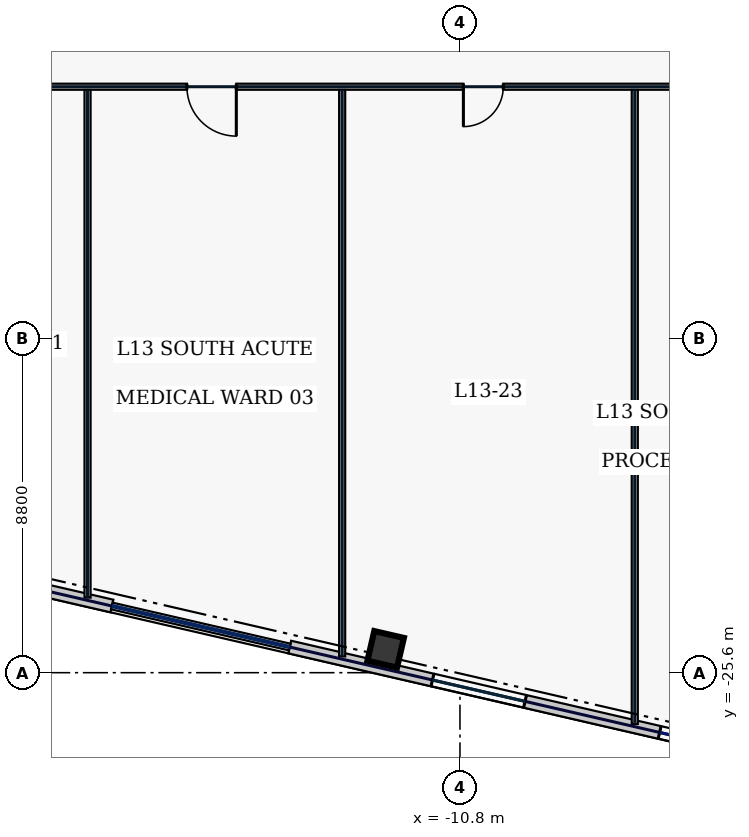
"""IFC4 building model, lengths in metres.
Left out: names, types, materials, properties, quantities, classifications, styles, units other than length and angle.
Written with IfcOpenShell. Run it as: python <this file> out.ifc"""

import sys

from ifc_helpers import new_model, si_unit, direction, frame, frame_2d, origin, origin_2d, place, context, subcontext, project, spatial, rectangle, hollow_rectangle, extrude, element, fill, save


model = new_model("IFC4")
c1 = context("Model", 3, precision=1e-05, world=origin(), true_north=direction((0.0, 1.0)))
c2 = subcontext(c1, "Body", "Model", "MODEL_VIEW")
j1 = project(units=[si_unit("LENGTHUNIT", "METRE"), si_unit("PLANEANGLEUNIT", "RADIAN")], contexts=[c1])
p1 = place(None, origin())
s1 = spatial("IfcSite", under=j1, at=p1, CompositionType="ELEMENT")
p2 = place(p1, origin())
s2 = spatial("IfcBuilding", under=s1, at=p2, CompositionType="ELEMENT")
p3 = place(p2, frame((0.0, 0.0, 63.4)))
s3 = spatial("IfcBuildingStorey", under=s2, at=p3, CompositionType="ELEMENT", Elevation=63.4)
p4 = place(p3, frame((-12.755, -24.985, 0.0), z_axis=(0.0, 0.0, 1.0), x_axis=(0.974370064785, -0.224951054344, 0.0)))
e1 = element("IfcColumn", 1, at=p4, inside=s3, PredefinedType="COLUMN", context=c2, shape_type="SweptSolid", body=[
    extrude(hollow_rectangle(XDim=0.8, YDim=0.8, WallThickness=0.036, at=origin_2d()), origin(), (0.0, 0.0, 1.0), 3.74),
])
p5 = place(p3, frame((-42.029, -18.75, 0.0), z_axis=(0.0, 0.0, 1.0), x_axis=(0.97436993772, -0.224951604723, 0.0)))
e2 = element("IfcWall", 2, at=p5, inside=s3, PredefinedType="STANDARD", context=c2, shape_type="SweptSolid", body=[
    extrude(rectangle(XDim=22.651, YDim=0.34, at=frame_2d((11.326, 0.0))), origin(), (0.0, 0.0, 1.0), 3.74),
])
p6 = place(p5, frame((2.062, 0.0, 0.72)))
e3 = element("IfcOpeningElement", 3, at=p6, cuts=e2, PredefinedType="OPENING", context=c2, shape_type="SweptSolid", body=[
    extrude(rectangle(XDim=2.5, YDim=2.15, at=frame_2d((1.25, 1.075))), frame((0.0, 0.18, 0.0), z_axis=(0.0, -1.0, 0.0), x_axis=(1.0, 0.0, 0.0)), (0.0, 0.0, 1.0), 0.36),
])
p7 = place(p5, frame((6.546, 0.0, 0.72)))
e4 = element("IfcOpeningElement", 4, at=p7, cuts=e2, PredefinedType="OPENING", context=c2, shape_type="SweptSolid", body=[
    extrude(rectangle(XDim=2.5, YDim=2.15, at=frame_2d((1.25, 1.075))), frame((0.0, 0.18, 0.0), z_axis=(0.0, -1.0, 0.0), x_axis=(1.0, 0.0, 0.0)), (0.0, 0.0, 1.0), 0.36),
])
p8 = place(p5, frame((13.461, 0.0, 0.72)))
e5 = element("IfcOpeningElement", 5, at=p8, cuts=e2, PredefinedType="OPENING", context=c2, shape_type="SweptSolid", body=[
    extrude(rectangle(XDim=0.85, YDim=1.85, at=frame_2d((0.425, 0.925))), frame((0.0, 0.18, 0.0), z_axis=(0.0, -1.0, 0.0), x_axis=(1.0, 0.0, 0.0)), (0.0, 0.0, 1.0), 0.36),
])
p9 = place(p3, frame((-15.281, -24.925, 0.0), z_axis=(0.0, 0.0, 1.0), x_axis=(0.974370193991, -0.22495049469, 0.0)))
e6 = element("IfcWall", 6, at=p9, inside=s3, PredefinedType="STANDARD", context=c2, shape_type="SweptSolid", body=[
    extrude(rectangle(XDim=14.697, YDim=0.34, at=frame_2d((7.349, 0.0))), origin(), (0.0, 0.0, 1.0), 3.74),
])
p10 = place(p9, frame((3.856, 0.0, 0.72)))
e7 = element("IfcOpeningElement", 7, at=p10, cuts=e6, PredefinedType="OPENING", context=c2, shape_type="SweptSolid", body=[
    extrude(rectangle(XDim=2.5, YDim=2.15, at=frame_2d((1.25, 1.075))), frame((0.0, 0.18, 0.0), z_axis=(0.0, -1.0, 0.0), x_axis=(1.0, 0.0, 0.0)), (0.0, 0.0, 1.0), 0.36),
])
p11 = place(p9, frame((9.991, 0.0, 0.72)))
e8 = element("IfcOpeningElement", 8, at=p11, cuts=e6, PredefinedType="OPENING", context=c2, shape_type="SweptSolid", body=[
    extrude(rectangle(XDim=0.85, YDim=1.85, at=frame_2d((0.425, 0.925))), frame((0.0, 0.18, 0.0), z_axis=(0.0, -1.0, 0.0), x_axis=(1.0, 0.0, 0.0)), (0.0, 0.0, 1.0), 0.36),
])
p12 = place(p3, frame((29.415, -10.18, 0.0), z_axis=(0.0, 0.0, 1.0), x_axis=(-1.0, 0.0, 0.0)))
e9 = element("IfcWall", 9, at=p12, inside=s3, PredefinedType="PARTITIONING", context=c2, shape_type="SweptSolid", body=[
    extrude(rectangle(XDim=58.83, YDim=0.16, at=frame_2d((29.415, 0.0))), origin(), (0.0, 0.0, 1.0), 3.74),
])
p13 = place(p12, frame((56.006, 0.0, 0.0)))
e10 = element("IfcOpeningElement", 10, at=p13, cuts=e9, PredefinedType="OPENING", context=c2, shape_type="SweptSolid", body=[
    extrude(rectangle(XDim=0.95, YDim=2.2, at=frame_2d((0.475, 1.1))), frame((0.0, 0.09, 0.0), z_axis=(0.0, -1.0, 0.0), x_axis=(1.0, 0.0, 0.0)), (0.0, 0.0, 1.0), 0.18),
])
p14 = place(p12, frame((51.75, 0.0, 0.0)))
e11 = element("IfcOpeningElement", 11, at=p14, cuts=e9, PredefinedType="OPENING", context=c2, shape_type="SweptSolid", body=[
    extrude(rectangle(XDim=0.95, YDim=2.2, at=frame_2d((0.475, 1.1))), frame((0.0, 0.09, 0.0), z_axis=(0.0, -1.0, 0.0), x_axis=(1.0, 0.0, 0.0)), (0.0, 0.0, 1.0), 0.18),
])
p15 = place(p12, frame((46.1, 0.0, 0.0)))
e12 = element("IfcOpeningElement", 12, at=p15, cuts=e9, PredefinedType="OPENING", context=c2, shape_type="SweptSolid", body=[
    extrude(rectangle(XDim=1.3, YDim=2.2, at=frame_2d((0.65, 1.1))), frame((0.0, 0.09, 0.0), z_axis=(0.0, -1.0, 0.0), x_axis=(1.0, 0.0, 0.0)), (0.0, 0.0, 1.0), 0.18),
])
p16 = place(p12, frame((39.075, 0.0, 0.0)))
e13 = element("IfcOpeningElement", 13, at=p16, cuts=e9, PredefinedType="OPENING", context=c2, shape_type="SweptSolid", body=[
    extrude(rectangle(XDim=1.05, YDim=2.2, at=frame_2d((0.525, 1.1))), frame((0.0, 0.09, 0.0), z_axis=(0.0, -1.0, 0.0), x_axis=(1.0, 0.0, 0.0)), (0.0, 0.0, 1.0), 0.18),
])
p17 = place(p12, frame((32.85, 0.0, 0.0)))
e14 = element("IfcOpeningElement", 14, at=p17, cuts=e9, PredefinedType="OPENING", context=c2, shape_type="SweptSolid", body=[
    extrude(rectangle(XDim=0.95, YDim=2.2, at=frame_2d((0.475, 1.1))), frame((0.0, 0.09, 0.0), z_axis=(0.0, -1.0, 0.0), x_axis=(1.0, 0.0, 0.0)), (0.0, 0.0, 1.0), 0.18),
])
p18 = place(p12, frame((28.55, 0.0, 0.0)))
e15 = element("IfcOpeningElement", 15, at=p18, cuts=e9, PredefinedType="OPENING", context=c2, shape_type="SweptSolid", body=[
    extrude(rectangle(XDim=0.95, YDim=2.2, at=frame_2d((0.475, 1.1))), frame((0.0, 0.09, 0.0), z_axis=(0.0, -1.0, 0.0), x_axis=(1.0, 0.0, 0.0)), (0.0, 0.0, 1.0), 0.18),
])
p19 = place(p12, frame((24.2, 0.0, 0.0)))
e16 = element("IfcOpeningElement", 16, at=p19, cuts=e9, PredefinedType="OPENING", context=c2, shape_type="SweptSolid", body=[
    extrude(rectangle(XDim=0.95, YDim=2.2, at=frame_2d((0.475, 1.1))), frame((0.0, 0.09, 0.0), z_axis=(0.0, -1.0, 0.0), x_axis=(1.0, 0.0, 0.0)), (0.0, 0.0, 1.0), 0.18),
])
p20 = place(p12, frame((19.8, 0.0, 0.0)))
e17 = element("IfcOpeningElement", 17, at=p20, cuts=e9, PredefinedType="OPENING", context=c2, shape_type="SweptSolid", body=[
    extrude(rectangle(XDim=0.95, YDim=2.2, at=frame_2d((0.475, 1.1))), frame((0.0, 0.09, 0.0), z_axis=(0.0, -1.0, 0.0), x_axis=(1.0, 0.0, 0.0)), (0.0, 0.0, 1.0), 0.18),
])
p21 = place(p12, frame((15.33, 0.0, 0.0)))
e18 = element("IfcOpeningElement", 18, at=p21, cuts=e9, PredefinedType="OPENING", context=c2, shape_type="SweptSolid", body=[
    extrude(rectangle(XDim=1.05, YDim=2.2, at=frame_2d((0.525, 1.1))), frame((0.0, 0.09, 0.0), z_axis=(0.0, -1.0, 0.0), x_axis=(1.0, 0.0, 0.0)), (0.0, 0.0, 1.0), 0.18),
])
p22 = place(p12, frame((11.055, 0.0, 0.0)))
e19 = element("IfcOpeningElement", 19, at=p22, cuts=e9, PredefinedType="OPENING", context=c2, shape_type="SweptSolid", body=[
    extrude(rectangle(XDim=1.3, YDim=2.2, at=frame_2d((0.65, 1.1))), frame((0.0, 0.09, 0.0), z_axis=(0.0, -1.0, 0.0), x_axis=(1.0, 0.0, 0.0)), (0.0, 0.0, 1.0), 0.18),
])
p23 = place(p12, frame((6.725, 0.0, 0.0)))
e20 = element("IfcOpeningElement", 20, at=p23, cuts=e9, PredefinedType="OPENING", context=c2, shape_type="SweptSolid", body=[
    extrude(rectangle(XDim=1.45, YDim=2.2, at=frame_2d((0.725, 1.1))), frame((0.0, 0.09, 0.0), z_axis=(0.0, -1.0, 0.0), x_axis=(1.0, 0.0, 0.0)), (0.0, 0.0, 1.0), 0.18),
])
p24 = place(p12, frame((2.044, 0.0, 0.0)))
e21 = element("IfcOpeningElement", 21, at=p24, cuts=e9, PredefinedType="OPENING", context=c2, shape_type="SweptSolid", body=[
    extrude(rectangle(XDim=0.95, YDim=2.2, at=frame_2d((0.475, 1.1))), frame((0.0, 0.09, 0.0), z_axis=(0.0, -1.0, 0.0), x_axis=(1.0, 0.0, 0.0)), (0.0, 0.0, 1.0), 0.18),
])
p25 = place(p3, frame((-20.6, -23.625, 0.0), z_axis=(0.0, 0.0, 1.0), x_axis=(0.0, 1.0, 0.0)))
e22 = element("IfcWall", 22, at=p25, inside=s3, PredefinedType="PARTITIONING", context=c2, shape_type="SweptSolid", body=[
    extrude(rectangle(XDim=13.36, YDim=0.16, at=frame_2d((6.68, 0.0))), origin(), (0.0, 0.0, 1.0), 3.74),
])
p26 = place(p3, frame((-13.9, -25.172, 0.0), z_axis=(0.0, 0.0, 1.0), x_axis=(0.0, 1.0, 0.0)))
e23 = element("IfcWall", 23, at=p26, inside=s3, PredefinedType="PARTITIONING", context=c2, shape_type="SweptSolid", body=[
    extrude(rectangle(XDim=14.907, YDim=0.16, at=frame_2d((7.454, 0.0))), origin(), (0.0, 0.0, 1.0), 3.74),
])
p27 = place(p3, frame((-6.2, -26.95, 0.0), z_axis=(0.0, 0.0, 1.0), x_axis=(0.0, 1.0, 0.0)))
e24 = element("IfcWall", 24, at=p27, inside=s3, PredefinedType="PARTITIONING", context=c2, shape_type="SweptSolid", body=[
    extrude(rectangle(XDim=16.685, YDim=0.16, at=frame_2d((8.342, 0.0))), origin(), (0.0, 0.0, 1.0), 3.74),
])
p28 = place(p10, origin())
e25 = element("IfcWindow", 25, at=p28, inside=s3, PartitioningType="SINGLE_PANEL", PredefinedType="WINDOW", context=c2, shape_type="SweptSolid", body=[
    extrude(rectangle(XDim=2.5, YDim=2.15, at=frame_2d((1.25, 1.075))), frame((0.0, 0.03, 0.0), z_axis=(0.0, -1.0, 0.0), x_axis=(1.0, 0.0, 0.0)), (0.0, 0.0, 1.0), 0.06),
])
fill(e7, e25)
p29 = place(p11, origin())
e26 = element("IfcWindow", 26, at=p29, inside=s3, PartitioningType="SINGLE_PANEL", PredefinedType="WINDOW", context=c2, shape_type="SweptSolid", body=[
    extrude(rectangle(XDim=0.85, YDim=1.85, at=frame_2d((0.425, 0.925))), frame((0.0, 0.03, 0.0), z_axis=(0.0, -1.0, 0.0), x_axis=(1.0, 0.0, 0.0)), (0.0, 0.0, 1.0), 0.06),
])
fill(e8, e26)
p30 = place(p15, origin())
e27 = element("IfcDoor", 27, at=p30, inside=s3, OperationType="SINGLE_SWING_LEFT", PredefinedType="DOOR", context=c2, shape_type="SweptSolid", body=[
    extrude(rectangle(XDim=1.3, YDim=2.2, at=frame_2d((0.65, 1.1))), frame((0.0, 0.025, 0.0), z_axis=(0.0, -1.0, 0.0), x_axis=(1.0, 0.0, 0.0)), (0.0, 0.0, 1.0), 0.05),
])
fill(e12, e27)
p31 = place(p16, origin())
e28 = element("IfcDoor", 28, at=p31, inside=s3, OperationType="SINGLE_SWING_RIGHT", PredefinedType="DOOR", context=c2, shape_type="SweptSolid", body=[
    extrude(rectangle(XDim=1.05, YDim=2.2, at=frame_2d((0.525, 1.1))), frame((0.0, 0.025, 0.0), z_axis=(0.0, -1.0, 0.0), x_axis=(1.0, 0.0, 0.0)), (0.0, 0.0, 1.0), 0.05),
])
fill(e13, e28)
save(model, sys.argv[1])
